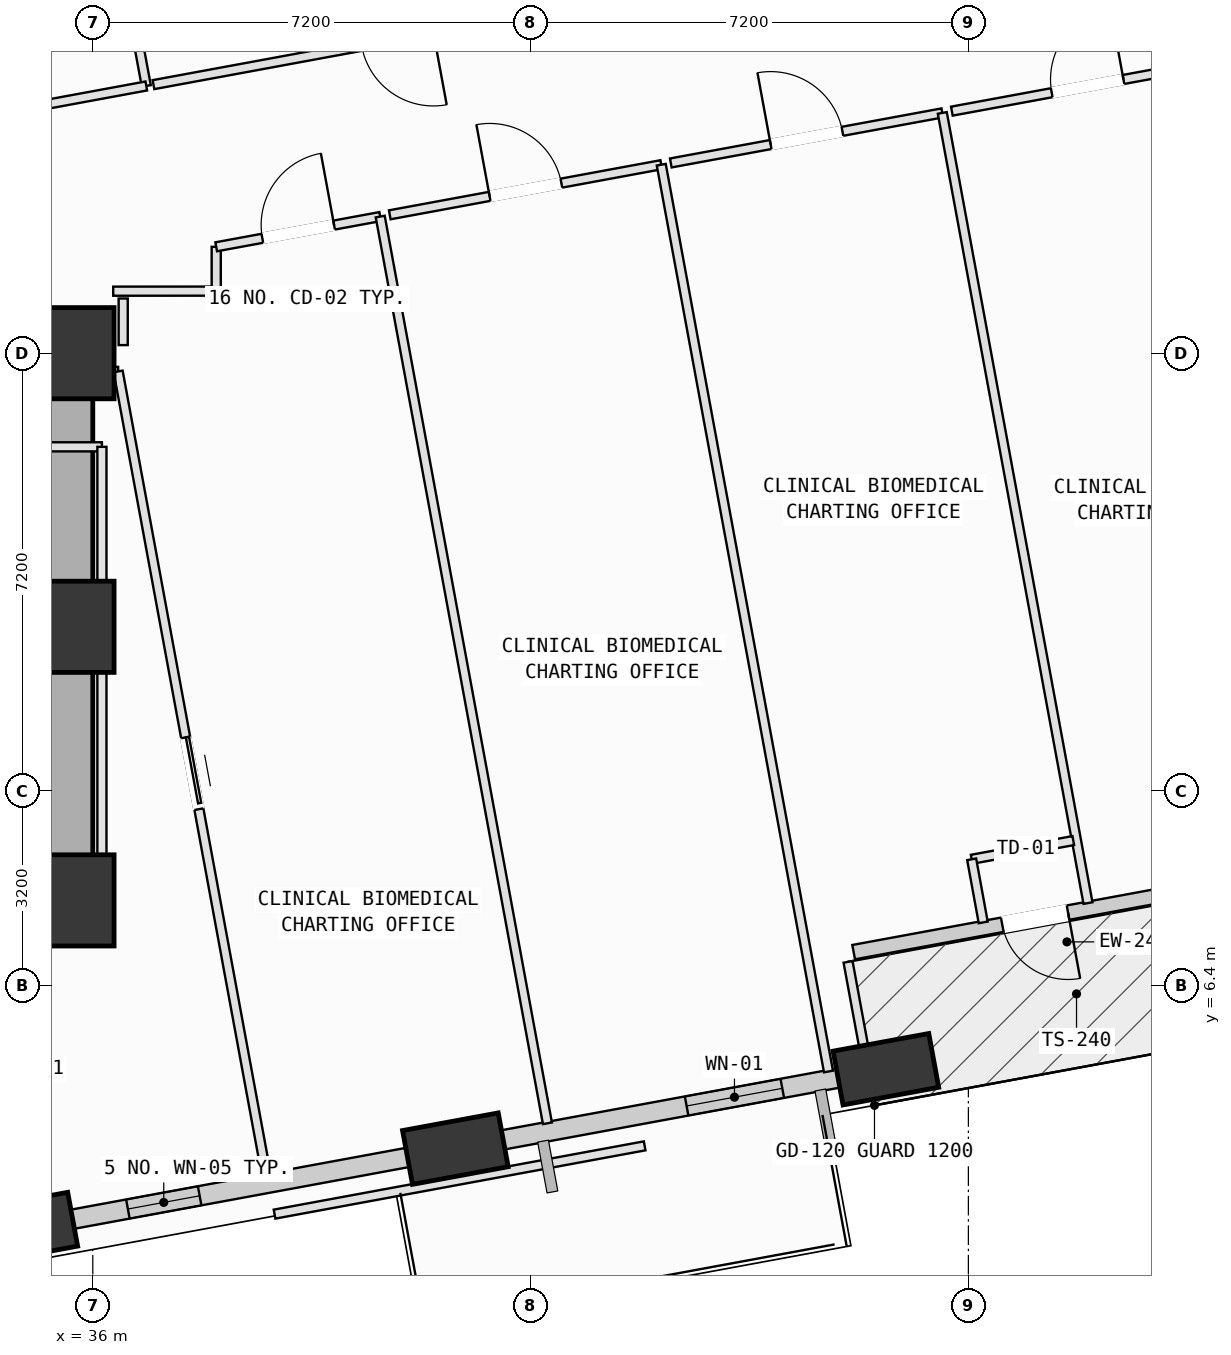
"""IFC4 building model, lengths in metres.
Left out: names, types, materials, properties, quantities, classifications, styles, units other than length and angle.
Written with IfcOpenShell. Run it as: python <this file> out.ifc"""

import sys

from ifc_helpers import new_model, si_unit, direction, frame, frame_2d, origin, origin_2d, place, context, subcontext, project, spatial, rectangle, extrude, element, fill, save


model = new_model("IFC4")
c1 = context("Model", 3, precision=1e-05, world=origin(), true_north=direction((0.0, 1.0)))
c2 = subcontext(c1, "Body", "Model", "MODEL_VIEW")
j1 = project(units=[si_unit("LENGTHUNIT", "METRE"), si_unit("PLANEANGLEUNIT", "RADIAN")], contexts=[c1])
p1 = place(None, origin())
s1 = spatial("IfcSite", under=j1, at=p1, CompositionType="ELEMENT")
p2 = place(p1, origin())
s2 = spatial("IfcBuilding", under=s1, at=p2, CompositionType="ELEMENT")
p3 = place(p2, frame((0.0, 0.0, 67.0)))
s3 = spatial("IfcBuildingStorey", under=s2, at=p3, CompositionType="ELEMENT", Elevation=67.0)
for number, where, z_axis, x_axis in (
    (1, (35.6, 7.8, 0.0), (0.0, 0.0, 1.0), (1.0, 0.0, 0.0)),
    (2, (35.6, 12.3, 0.0), (0.0, 0.0, 1.0), (1.0, 0.0, 0.0)),
    (3, (35.6, 16.8, 0.0), (0.0, 0.0, 1.0), (1.0, 0.0, 0.0)),
):
    element("IfcColumn", number, at=place(p3, frame(where, z_axis=z_axis, x_axis=x_axis)), inside=s3, PredefinedType="COLUMN", context=c2, shape_type="SweptSolid", body=[
        extrude(rectangle(XDim=1.5, YDim=1.5, at=origin_2d()), origin(), (0.0, 0.0, 1.0), 4.0),
    ])
p4 = place(p3, frame((34.882, 2.411, 0.002), z_axis=(0.092332756055, 0.006082526749, 0.995709628872), x_axis=(-0.244852017256, 0.969415188648, 0.016783374669)))
e4 = element("IfcColumn", 4, at=p4, inside=s3, PredefinedType="COLUMN", context=c2, shape_type="SweptSolid", body=[
    extrude(rectangle(XDim=1.6, YDim=0.9, at=origin_2d()), origin(), (0.0, 0.0, 1.0), 4.014),
])
p5 = place(p3, frame((41.963, 3.717, 0.002), z_axis=(0.08666774321, 0.035214472504, 0.995614706206), x_axis=(-0.537485100414, 0.843102524473, 0.016967617985)))
e5 = element("IfcColumn", 5, at=p5, inside=s3, PredefinedType="COLUMN", context=c2, shape_type="SweptSolid", body=[
    extrude(rectangle(XDim=1.6, YDim=0.9, at=origin_2d()), origin(), (0.0, 0.0, 1.0), 4.014),
])
p6 = place(p3, frame((49.043, 5.023, 0.002), z_axis=(0.080992624248, 0.064344477929, 0.994635603112), x_axis=(-0.752977498779, 0.657778746776, 0.018761839526)))
e6 = element("IfcColumn", 6, at=p6, inside=s3, PredefinedType="COLUMN", context=c2, shape_type="SweptSolid", body=[
    extrude(rectangle(XDim=1.6, YDim=0.9, at=origin_2d()), origin(), (0.0, 0.0, 1.0), 4.018),
])
p7 = place(p3, frame((55.358, 8.211, 0.0), z_axis=(0.0, 0.0, 1.0), x_axis=(-0.983411553053, -0.181388305362, 0.0)))
e7 = element("IfcWall", 7, at=p7, inside=s3, PredefinedType="SOLIDWALL", context=c2, shape_type="SweptSolid", body=[
    extrude(rectangle(XDim=6.96, YDim=0.24, at=frame_2d((3.48, 0.0))), origin(), (0.0, 0.0, 1.0), 3.165),
])
p8 = place(p7, frame((3.375, 0.0, 0.0)))
e8 = element("IfcOpeningElement", 8, at=p8, cuts=e7, PredefinedType="OPENING", context=c2, shape_type="SweptSolid", body=[
    extrude(rectangle(XDim=1.1, YDim=2.15, at=frame_2d((0.55, 1.075))), frame((0.0, 0.13, 0.0), z_axis=(0.0, -1.0, 0.0), x_axis=(1.0, 0.0, 0.0)), (0.0, 0.0, 1.0), 0.26),
])
p9 = place(p3, frame((41.547, 3.64, 0.0), z_axis=(0.0, 0.0, 1.0), x_axis=(-0.983417788938, -0.181354493742, 0.0)))
e9 = element("IfcWall", 9, at=p9, inside=s3, PredefinedType="SOLIDWALL", context=c2, shape_type="SweptSolid", body=[
    extrude(rectangle(XDim=5.985, YDim=0.32, at=frame_2d((2.993, 0.0))), origin(), (0.0, 0.0, 1.0), 3.165),
])
p10 = place(p9, frame((3.854, 0.0, 0.75)))
e10 = element("IfcOpeningElement", 10, at=p10, cuts=e9, PredefinedType="OPENING", context=c2, shape_type="SweptSolid", body=[
    extrude(rectangle(XDim=1.2, YDim=1.75, at=frame_2d((0.6, 0.875))), frame((0.0, 0.17, 0.0), z_axis=(0.0, -1.0, 0.0), x_axis=(1.0, 0.0, 0.0)), (0.0, 0.0, 1.0), 0.34),
])
p11 = place(p3, frame((48.579, 4.938, 0.0), z_axis=(0.0, 0.0, 1.0), x_axis=(-0.983412097266, -0.181385354842, 0.0)))
e11 = element("IfcWall", 11, at=p11, inside=s3, PredefinedType="SOLIDWALL", context=c2, shape_type="SweptSolid", body=[
    extrude(rectangle(XDim=5.937, YDim=0.32, at=frame_2d((2.969, 0.0))), origin(), (0.0, 0.0, 1.0), 3.165),
])
p12 = place(p11, frame((1.26, 0.0, 0.75)))
e12 = element("IfcOpeningElement", 12, at=p12, cuts=e11, PredefinedType="OPENING", context=c2, shape_type="SweptSolid", body=[
    extrude(rectangle(XDim=1.6, YDim=1.95, at=frame_2d((0.8, 0.975))), frame((0.0, 0.17, 0.0), z_axis=(0.0, -1.0, 0.0), x_axis=(1.0, 0.0, 0.0)), (0.0, 0.0, 1.0), 0.34),
])
p13 = place(p3, frame((24.8, 7.8, 0.0), z_axis=(0.0, 0.0, 1.0), x_axis=(1.0, 0.0, 0.0)))
e13 = element("IfcWall", 13, at=p13, inside=s3, PredefinedType="SHEAR", context=c2, shape_type="SweptSolid", body=[
    extrude(rectangle(XDim=10.8, YDim=0.8, at=frame_2d((5.4, 0.0))), origin(), (0.0, 0.0, 1.0), 3.78),
])
p14 = place(p3, frame((35.6, 7.8, 0.0), z_axis=(0.0, 0.0, 1.0), x_axis=(0.0, 1.0, 0.0)))
e14 = element("IfcWall", 14, at=p14, inside=s3, PredefinedType="SHEAR", context=c2, shape_type="SweptSolid", body=[
    extrude(rectangle(XDim=9.0, YDim=0.8, at=frame_2d((4.5, 0.0))), origin(), (0.0, 0.0, 1.0), 3.78),
])
p15 = place(p3, frame((36.15, 15.26, 0.0), z_axis=(0.0, 0.0, 1.0), x_axis=(-1.0, 0.0, 0.0)))
e15 = element("IfcWall", 15, at=p15, inside=s3, PredefinedType="PARTITIONING", context=c2, shape_type="SweptSolid", body=[
    extrude(rectangle(XDim=1.3, YDim=0.15, at=frame_2d((0.65, 0.0))), origin(), (0.0, 0.0, 1.0), 3.78),
])
p16 = place(p3, frame((34.7, 16.5, 0.0), z_axis=(0.0, 0.0, 1.0), x_axis=(1.0, 0.0, 0.0)))
e16 = element("IfcWall", 16, at=p16, inside=s3, PredefinedType="PARTITIONING", context=c2, shape_type="SweptSolid", body=[
    extrude(rectangle(XDim=1.717, YDim=0.15, at=frame_2d((0.858, 0.0))), origin(), (0.0, 0.0, 1.0), 2.865),
])
p17 = place(p3, frame((36.417, 16.5, 0.0), z_axis=(0.0, 0.0, 1.0), x_axis=(0.181371836751, -0.983414590513, 0.0)))
e17 = element("IfcWall", 17, at=p17, inside=s3, PredefinedType="PARTITIONING", context=c2, shape_type="SweptSolid", body=[
    extrude(rectangle(XDim=13.442, YDim=0.15, at=frame_2d((6.721, 0.0))), origin(), (0.0, 0.0, 1.0), 3.78),
])
p18 = place(p17, frame((6.121, 0.0, 0.0)))
e18 = element("IfcOpeningElement", 18, at=p18, cuts=e17, PredefinedType="OPENING", context=c2, shape_type="SweptSolid", body=[
    extrude(rectangle(XDim=1.2, YDim=2.15, at=frame_2d((0.6, 1.075))), frame((0.0, 0.085, 0.0), z_axis=(0.0, -1.0, 0.0), x_axis=(1.0, 0.0, 0.0)), (0.0, 0.0, 1.0), 0.17),
])
p19 = place(p3, frame((35.703, 2.329, 0.0), z_axis=(0.0, 0.0, 1.0), x_axis=(-0.983292662079, -0.182031702461, 0.0)))
e19 = element("IfcWall", 19, at=p19, inside=s3, PredefinedType="PARTITIONING", context=c2, shape_type="SweptSolid", body=[
    extrude(rectangle(XDim=1.215, YDim=0.15, at=frame_2d((0.607, 0.0))), origin(), (0.0, 0.0, 1.0), 3.165),
])
p20 = place(p3, frame((35.6, 7.5, 0.0), z_axis=(0.0, 0.0, 1.0), x_axis=(1.0, 0.0, 0.0)))
e20 = element("IfcWall", 20, at=p20, inside=s3, PredefinedType="PARTITIONING", context=c2, shape_type="SweptSolid", body=[
    extrude(rectangle(XDim=0.55, YDim=0.15, at=frame_2d((0.275, 0.0))), origin(), (0.0, 0.0, 1.0), 3.78),
])
p21 = place(p3, frame((36.15, 7.5, 0.0), z_axis=(0.0, 0.0, 1.0), x_axis=(0.0, 1.0, 0.0)))
e21 = element("IfcWall", 21, at=p21, inside=s3, PredefinedType="PARTITIONING", context=c2, shape_type="SweptSolid", body=[
    extrude(rectangle(XDim=7.76, YDim=0.15, at=frame_2d((3.88, 0.0))), origin(), (0.0, 0.0, 1.0), 3.78),
])
p22 = place(p3, frame((36.336, 17.82, 0.0), z_axis=(0.0, 0.0, 1.0), x_axis=(0.999999829655, 0.000583685878, 0.0)))
e22 = element("IfcWall", 22, at=p22, inside=s3, PredefinedType="PARTITIONING", context=c2, shape_type="SweptSolid", body=[
    extrude(rectangle(XDim=1.673, YDim=0.15, at=frame_2d((0.836, 0.0))), origin(), (0.0, 0.0, 1.0), 3.78),
])
p23 = place(p3, frame((38.03, 17.85, 0.0), z_axis=(0.0, 0.0, 1.0), x_axis=(0.0, 1.0, 0.0)))
e23 = element("IfcWall", 23, at=p23, inside=s3, PredefinedType="PARTITIONING", context=c2, shape_type="SweptSolid", body=[
    extrude(rectangle(XDim=0.7, YDim=0.15, at=frame_2d((0.35, 0.0))), origin(), (0.0, 0.0, 1.0), 3.78),
])
p24 = place(p3, frame((38.03, 18.55, 0.0), z_axis=(0.0, 0.0, 1.0), x_axis=(0.983436906471, 0.181250795834, 0.0)))
e24 = element("IfcWall", 24, at=p24, inside=s3, PredefinedType="PARTITIONING", context=c2, shape_type="SweptSolid", body=[
    extrude(rectangle(XDim=2.742, YDim=0.15, at=frame_2d((1.371, 0.0))), origin(), (0.0, 0.0, 1.0), 3.78),
])
p25 = place(p24, frame((0.771, 0.0, 0.0)))
e25 = element("IfcOpeningElement", 25, at=p25, cuts=e24, PredefinedType="OPENING", context=c2, shape_type="SweptSolid", body=[
    extrude(rectangle(XDim=1.2, YDim=2.15, at=frame_2d((0.6, 1.075))), frame((0.0, 0.085, 0.0), z_axis=(0.0, -1.0, 0.0), x_axis=(1.0, 0.0, 0.0)), (0.0, 0.0, 1.0), 0.17),
])
p26 = place(p3, frame((40.727, 19.047, 0.0), z_axis=(0.0, 0.0, 1.0), x_axis=(0.181344362181, -0.98341965727, 0.0)))
e26 = element("IfcWall", 26, at=p26, inside=s3, PredefinedType="PARTITIONING", context=c2, shape_type="SweptSolid", body=[
    extrude(rectangle(XDim=15.165, YDim=0.15, at=frame_2d((7.582, 0.0))), origin(), (0.0, 0.0, 1.0), 3.78),
])
p27 = place(p3, frame((36.5, 16.933, 0.0), z_axis=(0.0, 0.0, 1.0), x_axis=(0.0, 1.0, 0.0)))
e27 = element("IfcWall", 27, at=p27, inside=s3, PredefinedType="PARTITIONING", context=c2, shape_type="SweptSolid", body=[
    extrude(rectangle(XDim=0.767, YDim=0.15, at=frame_2d((0.383, 0.0))), origin(), (0.0, 0.0, 1.0), 3.78),
])
p28 = place(p3, frame((40.884, 19.076, 0.0), z_axis=(0.0, 0.0, 1.0), x_axis=(0.983395912318, 0.181473082403, 0.0)))
e28 = element("IfcWall", 28, at=p28, inside=s3, PredefinedType="PARTITIONING", context=c2, shape_type="SweptSolid", body=[
    extrude(rectangle(XDim=4.541, YDim=0.15, at=frame_2d((2.27, 0.0))), origin(), (0.0, 0.0, 1.0), 3.78),
])
p29 = place(p28, frame((1.67, 0.0, 0.0)))
e29 = element("IfcOpeningElement", 29, at=p29, cuts=e28, PredefinedType="OPENING", context=c2, shape_type="SweptSolid", body=[
    extrude(rectangle(XDim=1.2, YDim=2.15, at=frame_2d((0.6, 1.075))), frame((0.0, 0.085, 0.0), z_axis=(0.0, -1.0, 0.0), x_axis=(1.0, 0.0, 0.0)), (0.0, 0.0, 1.0), 0.17),
])
p30 = place(p3, frame((45.349, 19.9, 0.0), z_axis=(0.0, 0.0, 1.0), x_axis=(0.181335749164, -0.983421245487, 0.0)))
e30 = element("IfcWall", 30, at=p30, inside=s3, PredefinedType="PARTITIONING", context=c2, shape_type="SweptSolid", body=[
    extrude(rectangle(XDim=15.165, YDim=0.15, at=frame_2d((7.583, 0.0))), origin(), (0.0, 0.0, 1.0), 3.78),
])
p31 = place(p3, frame((45.506, 19.929, 0.0), z_axis=(0.0, 0.0, 1.0), x_axis=(0.983432507903, 0.181274660113, 0.0)))
e31 = element("IfcWall", 31, at=p31, inside=s3, PredefinedType="PARTITIONING", context=c2, shape_type="SweptSolid", body=[
    extrude(rectangle(XDim=4.54, YDim=0.15, at=frame_2d((2.27, 0.0))), origin(), (0.0, 0.0, 1.0), 3.78),
])
p32 = place(p31, frame((1.67, 0.0, 0.0)))
e32 = element("IfcOpeningElement", 32, at=p32, cuts=e31, PredefinedType="OPENING", context=c2, shape_type="SweptSolid", body=[
    extrude(rectangle(XDim=1.2, YDim=2.15, at=frame_2d((0.6, 1.075))), frame((0.0, 0.085, 0.0), z_axis=(0.0, -1.0, 0.0), x_axis=(1.0, 0.0, 0.0)), (0.0, 0.0, 1.0), 0.17),
])
p33 = place(p3, frame((49.971, 20.752, 0.0), z_axis=(0.0, 0.0, 1.0), x_axis=(0.181310546622, -0.983425892319, 0.0)))
e33 = element("IfcWall", 33, at=p33, inside=s3, PredefinedType="PARTITIONING", context=c2, shape_type="SweptSolid", body=[
    extrude(rectangle(XDim=13.215, YDim=0.15, at=frame_2d((6.607, 0.0))), origin(), (0.0, 0.0, 1.0), 3.78),
])
p34 = place(p3, frame((52.125, 8.784, 0.0), z_axis=(0.0, 0.0, 1.0), x_axis=(-0.983446450717, -0.181199002682, 0.0)))
e34 = element("IfcWall", 34, at=p34, inside=s3, PredefinedType="PARTITIONING", context=c2, shape_type="SweptSolid", body=[
    extrude(rectangle(XDim=1.699, YDim=0.15, at=frame_2d((0.85, 0.0))), origin(), (0.0, 0.0, 1.0), 3.78),
])
p35 = place(p3, frame((50.454, 8.476, 0.0), z_axis=(0.0, 0.0, 1.0), x_axis=(0.179984667326, -0.983669415773, 0.0)))
e35 = element("IfcWall", 35, at=p35, inside=s3, PredefinedType="PARTITIONING", context=c2, shape_type="SweptSolid", body=[
    extrude(rectangle(XDim=1.055, YDim=0.15, at=frame_2d((0.528, 0.0))), origin(), (0.0, 0.0, 1.0), 3.78),
])
p36 = place(p3, frame((48.421, 6.789, 0.0), z_axis=(0.0, 0.0, 1.0), x_axis=(0.181374568917, -0.983414086614, 0.0)))
e36 = element("IfcWall", 36, at=p36, inside=s3, PredefinedType="PARTITIONING", context=c2, shape_type="SweptSolid", body=[
    extrude(rectangle(XDim=2.08, YDim=0.15, at=frame_2d((1.04, 0.0))), origin(), (0.0, 0.0, 1.0), 3.78),
])
p37 = place(p3, frame((50.128, 20.781, 0.0), z_axis=(0.0, 0.0, 1.0), x_axis=(0.983395912318, 0.181473082403, 0.0)))
e37 = element("IfcWall", 37, at=p37, inside=s3, PredefinedType="PARTITIONING", context=c2, shape_type="SweptSolid", body=[
    extrude(rectangle(XDim=4.541, YDim=0.15, at=frame_2d((2.27, 0.0))), origin(), (0.0, 0.0, 1.0), 3.78),
])
p38 = place(p37, frame((1.67, 0.0, 0.0)))
e38 = element("IfcOpeningElement", 38, at=p38, cuts=e37, PredefinedType="OPENING", context=c2, shape_type="SweptSolid", body=[
    extrude(rectangle(XDim=1.2, YDim=2.15, at=frame_2d((0.6, 1.075))), frame((0.0, 0.085, 0.0), z_axis=(0.0, -1.0, 0.0), x_axis=(1.0, 0.0, 0.0)), (0.0, 0.0, 1.0), 0.17),
])
p39 = place(p3, frame((36.398, 23.806, 0.0), z_axis=(0.0, 0.0, 1.0), x_axis=(0.181522853733, -0.983386726356, 0.0)))
e39 = element("IfcWall", 39, at=p39, inside=s3, PredefinedType="PARTITIONING", context=c2, shape_type="SweptSolid", body=[
    extrude(rectangle(XDim=2.655, YDim=0.15, at=frame_2d((1.328, 0.0))), origin(), (0.0, 0.0, 1.0), 3.78),
])
p40 = place(p3, frame((36.88, 21.195, 0.0), z_axis=(0.0, 0.0, 1.0), x_axis=(-0.983418741688, -0.181349327256, 0.0)))
e40 = element("IfcWall", 40, at=p40, inside=s3, PredefinedType="PARTITIONING", context=c2, shape_type="SweptSolid", body=[
    extrude(rectangle(XDim=3.391, YDim=0.15, at=frame_2d((1.696, 0.0))), origin(), (0.0, 0.0, 1.0), 3.78),
])
p41 = place(p3, frame((45.027, 22.698, 0.0), z_axis=(0.0, 0.0, 1.0), x_axis=(-0.983411242351, -0.181389989847, 0.0)))
e41 = element("IfcWall", 41, at=p41, inside=s3, PredefinedType="PARTITIONING", context=c2, shape_type="SweptSolid", body=[
    extrude(rectangle(XDim=8.165, YDim=0.15, at=frame_2d((4.082, 0.0))), origin(), (0.0, 0.0, 1.0), 3.78),
])
p42 = place(p41, frame((3.482, 0.0, 0.0)))
e42 = element("IfcOpeningElement", 42, at=p42, cuts=e41, PredefinedType="OPENING", context=c2, shape_type="SweptSolid", body=[
    extrude(rectangle(XDim=1.2, YDim=2.15, at=frame_2d((0.6, 1.075))), frame((0.0, 0.085, 0.0), z_axis=(0.0, -1.0, 0.0), x_axis=(1.0, 0.0, 0.0)), (0.0, 0.0, 1.0), 0.17),
])
p43 = place(p3, frame((45.076, 3.763, 0.0), z_axis=(0.0, 0.0, 1.0), x_axis=(-0.983402108303, -0.181439503377, 0.0)))
e43 = element("IfcWall", 43, at=p43, inside=s3, PredefinedType="PARTITIONING", context=c2, shape_type="SweptSolid", body=[
    extrude(rectangle(XDim=6.19, YDim=0.15, at=frame_2d((3.095, 0.0))), origin(), (0.0, 0.0, 1.0), 3.78),
])
p44 = place(p8, origin())
e44 = element("IfcDoor", 44, at=p44, inside=s3, OperationType="SINGLE_SWING_LEFT", PredefinedType="DOOR", context=c2, shape_type="SweptSolid", body=[
    extrude(rectangle(XDim=1.1, YDim=2.15, at=frame_2d((0.55, 1.075))), frame((0.0, 0.025, 0.0), z_axis=(0.0, -1.0, 0.0), x_axis=(1.0, 0.0, 0.0)), (0.0, 0.0, 1.0), 0.05),
])
fill(e8, e44)
p45 = place(p10, origin())
e45 = element("IfcWindow", 45, at=p45, inside=s3, PartitioningType="SINGLE_PANEL", PredefinedType="WINDOW", context=c2, shape_type="SweptSolid", body=[
    extrude(rectangle(XDim=1.2, YDim=1.75, at=frame_2d((0.6, 0.875))), frame((0.0, 0.03, 0.0), z_axis=(0.0, -1.0, 0.0), x_axis=(1.0, 0.0, 0.0)), (0.0, 0.0, 1.0), 0.06),
])
fill(e10, e45)
p46 = place(p12, origin())
e46 = element("IfcWindow", 46, at=p46, inside=s3, PartitioningType="SINGLE_PANEL", PredefinedType="WINDOW", context=c2, shape_type="SweptSolid", body=[
    extrude(rectangle(XDim=1.6, YDim=1.95, at=frame_2d((0.8, 0.975))), frame((0.0, 0.03, 0.0), z_axis=(0.0, -1.0, 0.0), x_axis=(1.0, 0.0, 0.0)), (0.0, 0.0, 1.0), 0.06),
])
fill(e12, e46)
p47 = place(p25, origin())
e47 = element("IfcDoor", 47, at=p47, inside=s3, OperationType="SINGLE_SWING_RIGHT", PredefinedType="DOOR", context=c2, shape_type="SweptSolid", body=[
    extrude(rectangle(XDim=1.2, YDim=2.15, at=frame_2d((0.6, 1.075))), frame((0.0, 0.025, 0.0), z_axis=(0.0, -1.0, 0.0), x_axis=(1.0, 0.0, 0.0)), (0.0, 0.0, 1.0), 0.05),
])
fill(e25, e47)
p48 = place(p29, origin())
e48 = element("IfcDoor", 48, at=p48, inside=s3, OperationType="SINGLE_SWING_LEFT", PredefinedType="DOOR", context=c2, shape_type="SweptSolid", body=[
    extrude(rectangle(XDim=1.2, YDim=2.15, at=frame_2d((0.6, 1.075))), frame((0.0, 0.025, 0.0), z_axis=(0.0, -1.0, 0.0), x_axis=(1.0, 0.0, 0.0)), (0.0, 0.0, 1.0), 0.05),
])
fill(e29, e48)
p49 = place(p32, origin())
e49 = element("IfcDoor", 49, at=p49, inside=s3, OperationType="SINGLE_SWING_LEFT", PredefinedType="DOOR", context=c2, shape_type="SweptSolid", body=[
    extrude(rectangle(XDim=1.2, YDim=2.15, at=frame_2d((0.6, 1.075))), frame((0.0, 0.025, 0.0), z_axis=(0.0, -1.0, 0.0), x_axis=(1.0, 0.0, 0.0)), (0.0, 0.0, 1.0), 0.05),
])
fill(e32, e49)
p50 = place(p38, origin())
e50 = element("IfcDoor", 50, at=p50, inside=s3, OperationType="SINGLE_SWING_RIGHT", PredefinedType="DOOR", context=c2, shape_type="SweptSolid", body=[
    extrude(rectangle(XDim=1.2, YDim=2.15, at=frame_2d((0.6, 1.075))), frame((0.0, 0.025, 0.0), z_axis=(0.0, -1.0, 0.0), x_axis=(1.0, 0.0, 0.0)), (0.0, 0.0, 1.0), 0.05),
])
fill(e38, e50)
p51 = place(p18, origin())
e51 = element("IfcDoor", 51, at=p51, inside=s3, OperationType="SLIDING_TO_LEFT", PredefinedType="DOOR", context=c2, shape_type="SweptSolid", body=[
    extrude(rectangle(XDim=1.2, YDim=2.15, at=frame_2d((0.6, 1.075))), frame((0.0, 0.025, 0.0), z_axis=(0.0, -1.0, 0.0), x_axis=(1.0, 0.0, 0.0)), (0.0, 0.0, 1.0), 0.05),
])
fill(e18, e51)
save(model, sys.argv[1])
